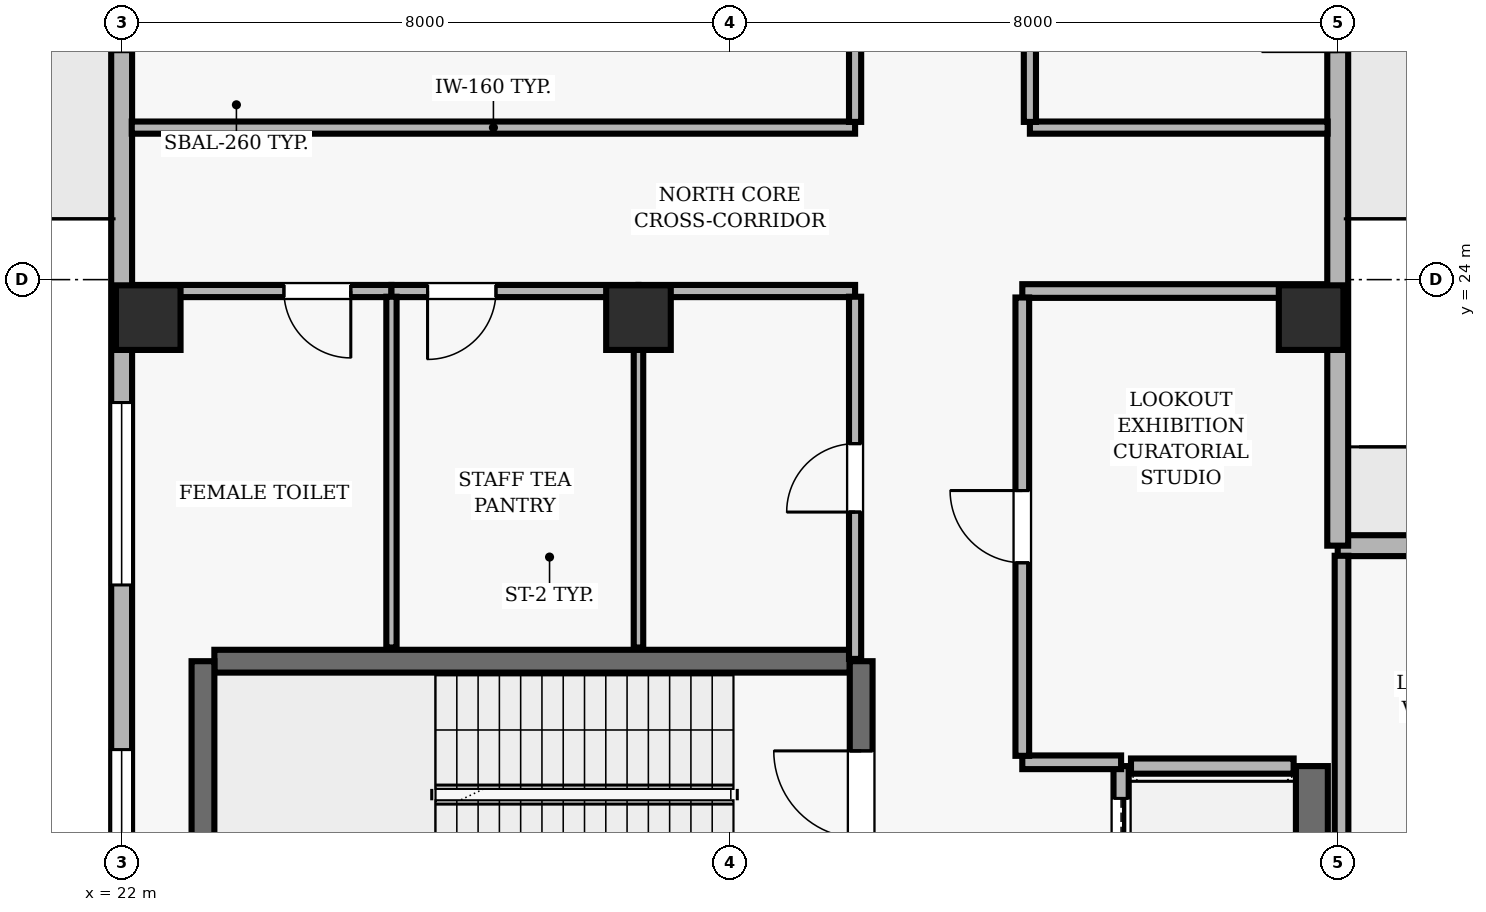
"""IFC4 building model, lengths in metres.
Left out: names, types, materials, properties, quantities, classifications, styles, units other than length and angle.
Written with IfcOpenShell. Run it as: python <this file> out.ifc"""

import sys

from ifc_helpers import new_model, si_unit, direction, frame, frame_2d, origin, origin_2d, place, context, subcontext, project, spatial, rectangle, extrude, element, fill, save


model = new_model("IFC4")
c1 = context("Model", 3, precision=1e-05, world=origin(), true_north=direction((0.0, 1.0)))
c2 = subcontext(c1, "Body", "Model", "MODEL_VIEW")
j1 = project(units=[si_unit("LENGTHUNIT", "METRE"), si_unit("PLANEANGLEUNIT", "RADIAN")], contexts=[c1])
p1 = place(None, origin())
s1 = spatial("IfcSite", under=j1, at=p1, CompositionType="ELEMENT")
p2 = place(p1, origin())
s2 = spatial("IfcBuilding", under=s1, at=p2, CompositionType="ELEMENT")
p3 = place(p2, frame((0.0, 0.0, 311.7)))
s3 = spatial("IfcBuildingStorey", under=s2, at=p3, CompositionType="ELEMENT", Elevation=311.7)
for number, where, z_axis, x_axis in (
    (1, (22.35, 23.5, 0.0), (0.0, 0.0, 1.0), (1.0, 0.0, 0.0)),
    (2, (28.8, 23.5, 0.0), (0.0, 0.0, 1.0), (1.0, 0.0, 0.0)),
    (3, (37.65, 23.5, 0.0), (0.0, 0.0, 1.0), (1.0, 0.0, 0.0)),
):
    element("IfcColumn", number, at=place(p3, frame(where, z_axis=z_axis, x_axis=x_axis)), inside=s3, PredefinedType="COLUMN", context=c2, shape_type="SweptSolid", body=[
        extrude(rectangle(XDim=0.85, YDim=0.85, at=origin_2d()), origin(), (0.0, 0.0, 1.0), 5.0),
    ])
p4 = place(p3, frame((41.15, 20.5, 0.0), z_axis=(0.0, 0.0, 1.0), x_axis=(-1.0, 0.0, 0.0)))
e4 = element("IfcWall", 4, at=p4, inside=s3, PredefinedType="SOLIDWALL", context=c2, shape_type="SweptSolid", body=[
    extrude(rectangle(XDim=3.15, YDim=0.275, at=frame_2d((1.575, 0.0))), origin(), (0.0, 0.0, 1.0), 4.74),
])
p5 = place(p3, frame((38.0, 20.5, 0.0), z_axis=(0.0, 0.0, 1.0), x_axis=(0.0, 1.0, 0.0)))
e5 = element("IfcWall", 5, at=p5, inside=s3, PredefinedType="SOLIDWALL", context=c2, shape_type="SweptSolid", body=[
    extrude(rectangle(XDim=14.8, YDim=0.275, at=frame_2d((7.4, 0.0))), origin(), (0.0, 0.0, 1.0), 4.74),
])
p6 = place(p5, frame((6.5, 0.0, 0.0)))
e6 = element("IfcOpeningElement", 6, at=p6, cuts=e5, PredefinedType="OPENING", context=c2, shape_type="SweptSolid", body=[
    extrude(rectangle(XDim=1.0, YDim=2.2, at=frame_2d((0.5, 1.1))), frame((0.0, 0.147, 0.0), z_axis=(0.0, -1.0, 0.0), x_axis=(1.0, 0.0, 0.0)), (0.0, 0.0, 1.0), 0.295),
])
p7 = place(p5, frame((10.5, 0.0, 0.9)))
e7 = element("IfcOpeningElement", 7, at=p7, cuts=e5, PredefinedType="OPENING", context=c2, shape_type="SweptSolid", body=[
    extrude(rectangle(XDim=1.2, YDim=1.6, at=frame_2d((0.6, 0.8))), frame((0.0, 0.147, 0.0), z_axis=(0.0, -1.0, 0.0), x_axis=(1.0, 0.0, 0.0)), (0.0, 0.0, 1.0), 0.295),
])
p8 = place(p3, frame((22.0, 35.3, 0.0), z_axis=(0.0, 0.0, 1.0), x_axis=(0.0, -1.0, 0.0)))
e8 = element("IfcWall", 8, at=p8, inside=s3, PredefinedType="SOLIDWALL", context=c2, shape_type="SweptSolid", body=[
    extrude(rectangle(XDim=32.8, YDim=0.275, at=frame_2d((16.4, 0.0))), origin(), (0.0, 0.0, 1.0), 4.74),
])
p9 = place(p8, frame((7.3, 0.0, 0.0)))
e9 = element("IfcOpeningElement", 9, at=p9, cuts=e8, PredefinedType="OPENING", context=c2, shape_type="SweptSolid", body=[
    extrude(rectangle(XDim=1.0, YDim=2.2, at=frame_2d((0.5, 1.1))), frame((0.0, 0.147, 0.0), z_axis=(0.0, -1.0, 0.0), x_axis=(1.0, 0.0, 0.0)), (0.0, 0.0, 1.0), 0.295),
])
p10 = place(p8, frame((1.533, 0.0, 0.9)))
e10 = element("IfcOpeningElement", 10, at=p10, cuts=e8, PredefinedType="OPENING", context=c2, shape_type="SweptSolid", body=[
    extrude(rectangle(XDim=2.4, YDim=1.6, at=frame_2d((1.2, 0.8))), frame((0.0, 0.147, 0.0), z_axis=(0.0, -1.0, 0.0), x_axis=(1.0, 0.0, 0.0)), (0.0, 0.0, 1.0), 0.295),
])
p11 = place(p8, frame((12.917, 0.0, 0.9)))
e11 = element("IfcOpeningElement", 11, at=p11, cuts=e8, PredefinedType="OPENING", context=c2, shape_type="SweptSolid", body=[
    extrude(rectangle(XDim=2.4, YDim=1.6, at=frame_2d((1.2, 0.8))), frame((0.0, 0.147, 0.0), z_axis=(0.0, -1.0, 0.0), x_axis=(1.0, 0.0, 0.0)), (0.0, 0.0, 1.0), 0.295),
])
p12 = place(p8, frame((17.483, 0.0, 0.9)))
e12 = element("IfcOpeningElement", 12, at=p12, cuts=e8, PredefinedType="OPENING", context=c2, shape_type="SweptSolid", body=[
    extrude(rectangle(XDim=2.4, YDim=1.6, at=frame_2d((1.2, 0.8))), frame((0.0, 0.147, 0.0), z_axis=(0.0, -1.0, 0.0), x_axis=(1.0, 0.0, 0.0)), (0.0, 0.0, 1.0), 0.295),
])
p13 = place(p8, frame((23.4, 0.0, 0.9)))
e13 = element("IfcOpeningElement", 13, at=p13, cuts=e8, PredefinedType="OPENING", context=c2, shape_type="SweptSolid", body=[
    extrude(rectangle(XDim=2.4, YDim=1.6, at=frame_2d((1.2, 0.8))), frame((0.0, 0.147, 0.0), z_axis=(0.0, -1.0, 0.0), x_axis=(1.0, 0.0, 0.0)), (0.0, 0.0, 1.0), 0.295),
])
p14 = place(p3, frame((31.58, 18.98, 0.0), z_axis=(0.0, 0.0, 1.0), x_axis=(-1.0, 0.0, 0.0)))
e14 = element("IfcWall", 14, at=p14, inside=s3, PredefinedType="SHEAR", context=c2, shape_type="SweptSolid", body=[
    extrude(rectangle(XDim=8.36, YDim=0.3, at=frame_2d((4.18, 0.0))), origin(), (0.0, 0.0, 1.0), 4.74),
])
p15 = place(p3, frame((23.07, 18.98, 0.0), z_axis=(0.0, 0.0, 1.0), x_axis=(0.0, -1.0, 0.0)))
e15 = element("IfcWall", 15, at=p15, inside=s3, PredefinedType="SHEAR", context=c2, shape_type="SweptSolid", body=[
    extrude(rectangle(XDim=3.51, YDim=0.3, at=frame_2d((1.755, 0.0))), origin(), (0.0, 0.0, 1.0), 4.74),
])
p16 = place(p3, frame((31.73, 15.47, 0.0), z_axis=(0.0, 0.0, 1.0), x_axis=(0.0, 1.0, 0.0)))
e16 = element("IfcWall", 16, at=p16, inside=s3, PredefinedType="SHEAR", context=c2, shape_type="SweptSolid", body=[
    extrude(rectangle(XDim=3.51, YDim=0.3, at=frame_2d((1.755, 0.0))), origin(), (0.0, 0.0, 1.0), 4.74),
])
p17 = place(p16, frame((1.18, 0.0, 0.0)))
e17 = element("IfcOpeningElement", 17, at=p17, cuts=e16, PredefinedType="OPENING", context=c2, shape_type="SweptSolid", body=[
    extrude(rectangle(XDim=1.15, YDim=2.15, at=frame_2d((0.575, 1.075))), frame((0.0, 0.16, 0.0), z_axis=(0.0, -1.0, 0.0), x_axis=(1.0, 0.0, 0.0)), (0.0, 0.0, 1.0), 0.32),
])
p18 = place(p3, frame((35.15, 17.6, 0.0), z_axis=(0.0, 0.0, 1.0), x_axis=(0.0, -1.0, 0.0)))
e18 = element("IfcWall", 18, at=p18, inside=s3, PredefinedType="SOLIDWALL", context=c2, shape_type="SweptSolid", body=[
    extrude(rectangle(XDim=1.85, YDim=0.2, at=frame_2d((0.925, 0.0))), origin(), (0.0, 0.0, 1.0), 4.74),
])
p19 = place(p18, frame((0.425, 0.0, 0.0)))
e19 = element("IfcOpeningElement", 19, at=p19, cuts=e18, PredefinedType="OPENING", context=c2, shape_type="SweptSolid", body=[
    extrude(rectangle(XDim=1.0, YDim=2.1, at=frame_2d((0.5, 1.05))), frame((0.0, 0.11, 0.0), z_axis=(0.0, -1.0, 0.0), x_axis=(1.0, 0.0, 0.0)), (0.0, 0.0, 1.0), 0.22),
])
p20 = place(p3, frame((37.66, 15.75, 0.0), z_axis=(0.0, 0.0, 1.0), x_axis=(0.0, 1.0, 0.0)))
e20 = element("IfcWall", 20, at=p20, inside=s3, PredefinedType="SHEAR", context=c2, shape_type="SweptSolid", body=[
    extrude(rectangle(XDim=1.85, YDim=0.42, at=frame_2d((0.925, 0.0))), origin(), (0.0, 0.0, 1.0), 4.74),
])
p21 = place(p3, frame((37.42, 17.6, 0.0), z_axis=(0.0, 0.0, 1.0), x_axis=(-1.0, 0.0, 0.0)))
e21 = element("IfcWall", 21, at=p21, inside=s3, PredefinedType="SOLIDWALL", context=c2, shape_type="SweptSolid", body=[
    extrude(rectangle(XDim=2.14, YDim=0.2, at=frame_2d((1.07, 0.0))), origin(), (0.0, 0.0, 1.0), 4.74),
])
p22 = place(p3, frame((25.55, 23.85, 0.0), z_axis=(0.0, 0.0, 1.0), x_axis=(-1.0, 0.0, 0.0)))
e22 = element("IfcWall", 22, at=p22, inside=s3, PredefinedType="PARTITIONING", context=c2, shape_type="SweptSolid", body=[
    extrude(rectangle(XDim=3.35, YDim=0.16, at=frame_2d((1.675, 0.0))), origin(), (0.0, 0.0, 1.0), 4.271),
])
p23 = place(p22, frame((0.535, 0.0, 0.0)))
e23 = element("IfcOpeningElement", 23, at=p23, cuts=e22, PredefinedType="OPENING", context=c2, shape_type="SweptSolid", body=[
    extrude(rectangle(XDim=0.88, YDim=2.1, at=frame_2d((0.44, 1.05))), frame((0.0, 0.09, 0.0), z_axis=(0.0, -1.0, 0.0), x_axis=(1.0, 0.0, 0.0)), (0.0, 0.0, 1.0), 0.18),
])
p24 = place(p3, frame((28.8, 23.85, 0.0), z_axis=(0.0, 0.0, 1.0), x_axis=(-1.0, 0.0, 0.0)))
e24 = element("IfcWall", 24, at=p24, inside=s3, PredefinedType="PARTITIONING", context=c2, shape_type="SweptSolid", body=[
    extrude(rectangle(XDim=3.25, YDim=0.16, at=frame_2d((1.625, 0.0))), origin(), (0.0, 0.0, 1.0), 4.271),
])
p25 = place(p24, frame((1.875, 0.0, 0.0)))
e25 = element("IfcOpeningElement", 25, at=p25, cuts=e24, PredefinedType="OPENING", context=c2, shape_type="SweptSolid", body=[
    extrude(rectangle(XDim=0.9, YDim=2.1, at=frame_2d((0.45, 1.05))), frame((0.0, 0.09, 0.0), z_axis=(0.0, -1.0, 0.0), x_axis=(1.0, 0.0, 0.0)), (0.0, 0.0, 1.0), 0.18),
])
p26 = place(p3, frame((31.65, 23.85, 0.0), z_axis=(0.0, 0.0, 1.0), x_axis=(-1.0, 0.0, 0.0)))
e26 = element("IfcWall", 26, at=p26, inside=s3, PredefinedType="PARTITIONING", context=c2, shape_type="SweptSolid", body=[
    extrude(rectangle(XDim=2.85, YDim=0.16, at=frame_2d((1.425, 0.0))), origin(), (0.0, 0.0, 1.0), 4.271),
])
p27 = place(p3, frame((31.65, 26.0, 0.0), z_axis=(0.0, 0.0, 1.0), x_axis=(-1.0, 0.0, 0.0)))
e27 = element("IfcWall", 27, at=p27, inside=s3, PredefinedType="PARTITIONING", context=c2, shape_type="SweptSolid", body=[
    extrude(rectangle(XDim=9.517, YDim=0.16, at=frame_2d((4.758, 0.0))), origin(), (0.0, 0.0, 1.0), 4.74),
])
p28 = place(p3, frame((33.85, 17.65, 0.0), z_axis=(0.0, 0.0, 1.0), x_axis=(1.0, 0.0, 0.0)))
e28 = element("IfcWall", 28, at=p28, inside=s3, PredefinedType="PARTITIONING", context=c2, shape_type="SweptSolid", body=[
    extrude(rectangle(XDim=1.3, YDim=0.18, at=frame_2d((0.65, 0.0))), origin(), (0.0, 0.0, 1.0), 4.74),
])
p29 = place(p3, frame((37.85, 23.85, 0.0), z_axis=(0.0, 0.0, 1.0), x_axis=(-1.0, 0.0, 0.0)))
e29 = element("IfcWall", 29, at=p29, inside=s3, PredefinedType="PARTITIONING", context=c2, shape_type="SweptSolid", body=[
    extrude(rectangle(XDim=4.0, YDim=0.18, at=frame_2d((2.0, 0.0))), origin(), (0.0, 0.0, 1.0), 4.271),
])
p30 = place(p3, frame((37.867, 26.0, 0.0), z_axis=(0.0, 0.0, 1.0), x_axis=(-1.0, 0.0, 0.0)))
e30 = element("IfcWall", 30, at=p30, inside=s3, PredefinedType="PARTITIONING", context=c2, shape_type="SweptSolid", body=[
    extrude(rectangle(XDim=3.917, YDim=0.16, at=frame_2d((1.958, 0.0))), origin(), (0.0, 0.0, 1.0), 4.74),
])
p31 = place(p3, frame((25.55, 19.16, 0.0), z_axis=(0.0, 0.0, 1.0), x_axis=(0.0, 1.0, 0.0)))
e31 = element("IfcWall", 31, at=p31, inside=s3, PredefinedType="PARTITIONING", context=c2, shape_type="SweptSolid", body=[
    extrude(rectangle(XDim=4.615, YDim=0.135, at=frame_2d((2.308, 0.0))), origin(), (0.0, 0.0, 1.0), 4.74),
])
p32 = place(p3, frame((28.8, 23.775, 0.0), z_axis=(0.0, 0.0, 1.0), x_axis=(0.0, -1.0, 0.0)))
e32 = element("IfcWall", 32, at=p32, inside=s3, PredefinedType="PARTITIONING", context=c2, shape_type="SweptSolid", body=[
    extrude(rectangle(XDim=4.615, YDim=0.125, at=frame_2d((2.308, 0.0))), origin(), (0.0, 0.0, 1.0), 4.74),
])
p33 = place(p3, frame((31.65, 19.01, 0.0), z_axis=(0.0, 0.0, 1.0), x_axis=(0.0, 1.0, 0.0)))
e33 = element("IfcWall", 33, at=p33, inside=s3, PredefinedType="PARTITIONING", context=c2, shape_type="SweptSolid", body=[
    extrude(rectangle(XDim=4.765, YDim=0.16, at=frame_2d((2.382, 0.0))), origin(), (0.0, 0.0, 1.0), 4.74),
])
p34 = place(p33, frame((1.932, 0.0, 0.0)))
e34 = element("IfcOpeningElement", 34, at=p34, cuts=e33, PredefinedType="OPENING", context=c2, shape_type="SweptSolid", body=[
    extrude(rectangle(XDim=0.9, YDim=2.1, at=frame_2d((0.45, 1.05))), frame((0.0, 0.09, 0.0), z_axis=(0.0, -1.0, 0.0), x_axis=(1.0, 0.0, 0.0)), (0.0, 0.0, 1.0), 0.18),
])
p35 = place(p3, frame((31.65, 37.72, 0.0), z_axis=(0.0, 0.0, 1.0), x_axis=(0.0, -1.0, 0.0)))
e35 = element("IfcWall", 35, at=p35, inside=s3, PredefinedType="PARTITIONING", context=c2, shape_type="SweptSolid", body=[
    extrude(rectangle(XDim=11.645, YDim=0.16, at=frame_2d((5.823, 0.0))), origin(), (0.0, 0.0, 1.0), 4.74),
])
p36 = place(p35, frame((5.372, 0.0, 0.0)))
e36 = element("IfcOpeningElement", 36, at=p36, cuts=e35, PredefinedType="OPENING", context=c2, shape_type="SweptSolid", body=[
    extrude(rectangle(XDim=0.9, YDim=2.1, at=frame_2d((0.45, 1.05))), frame((0.0, 0.09, 0.0), z_axis=(0.0, -1.0, 0.0), x_axis=(1.0, 0.0, 0.0)), (0.0, 0.0, 1.0), 0.18),
])
p37 = place(p3, frame((33.85, 17.735, 0.0), z_axis=(0.0, 0.0, 1.0), x_axis=(0.0, 1.0, 0.0)))
e37 = element("IfcWall", 37, at=p37, inside=s3, PredefinedType="PARTITIONING", context=c2, shape_type="SweptSolid", body=[
    extrude(rectangle(XDim=6.03, YDim=0.18, at=frame_2d((3.015, 0.0))), origin(), (0.0, 0.0, 1.0), 4.74),
])
p38 = place(p37, frame((2.54, 0.0, 0.0)))
e38 = element("IfcOpeningElement", 38, at=p38, cuts=e37, PredefinedType="OPENING", context=c2, shape_type="SweptSolid", body=[
    extrude(rectangle(XDim=0.95, YDim=2.1, at=frame_2d((0.475, 1.05))), frame((0.0, 0.1, 0.0), z_axis=(0.0, -1.0, 0.0), x_axis=(1.0, 0.0, 0.0)), (0.0, 0.0, 1.0), 0.2),
])
p39 = place(p3, frame((33.95, 26.075, 0.0), z_axis=(0.0, 0.0, 1.0), x_axis=(0.0, 1.0, 0.0)))
e39 = element("IfcWall", 39, at=p39, inside=s3, PredefinedType="PARTITIONING", context=c2, shape_type="SweptSolid", body=[
    extrude(rectangle(XDim=11.645, YDim=0.16, at=frame_2d((5.823, 0.0))), origin(), (0.0, 0.0, 1.0), 4.74),
])
p40 = place(p39, frame((5.372, 0.0, 0.0)))
e40 = element("IfcOpeningElement", 40, at=p40, cuts=e39, PredefinedType="OPENING", context=c2, shape_type="SweptSolid", body=[
    extrude(rectangle(XDim=0.9, YDim=2.1, at=frame_2d((0.45, 1.05))), frame((0.0, 0.09, 0.0), z_axis=(0.0, -1.0, 0.0), x_axis=(1.0, 0.0, 0.0)), (0.0, 0.0, 1.0), 0.18),
])
p41 = place(p3, frame((38.05, 20.367, 0.0), z_axis=(0.0, 0.0, 1.0), x_axis=(0.0, -1.0, 0.0)))
e41 = element("IfcWall", 41, at=p41, inside=s3, PredefinedType="PARTITIONING", context=c2, shape_type="SweptSolid", body=[
    extrude(rectangle(XDim=4.292, YDim=0.18, at=frame_2d((2.146, 0.0))), origin(), (0.0, 0.0, 1.0), 4.271),
])
p42 = place(p11, origin())
e42 = element("IfcWindow", 42, at=p42, inside=s3, PartitioningType="SINGLE_PANEL", PredefinedType="WINDOW", context=c2, shape_type="SweptSolid", body=[
    extrude(rectangle(XDim=2.4, YDim=1.6, at=frame_2d((1.2, 0.8))), frame((0.0, 0.03, 0.0), z_axis=(0.0, -1.0, 0.0), x_axis=(1.0, 0.0, 0.0)), (0.0, 0.0, 1.0), 0.06),
])
fill(e11, e42)
p43 = place(p12, origin())
e43 = element("IfcWindow", 43, at=p43, inside=s3, PartitioningType="SINGLE_PANEL", PredefinedType="WINDOW", context=c2, shape_type="SweptSolid", body=[
    extrude(rectangle(XDim=2.4, YDim=1.6, at=frame_2d((1.2, 0.8))), frame((0.0, 0.03, 0.0), z_axis=(0.0, -1.0, 0.0), x_axis=(1.0, 0.0, 0.0)), (0.0, 0.0, 1.0), 0.06),
])
fill(e12, e43)
p44 = place(p17, origin())
e44 = element("IfcDoor", 44, at=p44, inside=s3, OperationType="SINGLE_SWING_RIGHT", PredefinedType="DOOR", context=c2, shape_type="SweptSolid", body=[
    extrude(rectangle(XDim=1.15, YDim=2.15, at=frame_2d((0.575, 1.075))), frame((0.0, 0.025, 0.0), z_axis=(0.0, -1.0, 0.0), x_axis=(1.0, 0.0, 0.0)), (0.0, 0.0, 1.0), 0.05),
])
fill(e17, e44)
p45 = place(p19, origin())
e45 = element("IfcDoor", 45, at=p45, inside=s3, OperationType="DOUBLE_DOOR_SLIDING", PredefinedType="DOOR", context=c2, shape_type="SweptSolid", body=[
    extrude(rectangle(XDim=1.0, YDim=2.1, at=frame_2d((0.5, 1.05))), frame((0.0, 0.025, 0.0), z_axis=(0.0, -1.0, 0.0), x_axis=(1.0, 0.0, 0.0)), (0.0, 0.0, 1.0), 0.05),
])
fill(e19, e45)
p46 = place(p38, origin())
e46 = element("IfcDoor", 46, at=p46, inside=s3, OperationType="SINGLE_SWING_RIGHT", PredefinedType="DOOR", context=c2, shape_type="SweptSolid", body=[
    extrude(rectangle(XDim=0.95, YDim=2.1, at=frame_2d((0.475, 1.05))), frame((0.0, 0.025, 0.0), z_axis=(0.0, -1.0, 0.0), x_axis=(1.0, 0.0, 0.0)), (0.0, 0.0, 1.0), 0.05),
])
fill(e38, e46)
p47 = place(p34, origin())
e47 = element("IfcDoor", 47, at=p47, inside=s3, OperationType="SINGLE_SWING_LEFT", PredefinedType="DOOR", context=c2, shape_type="SweptSolid", body=[
    extrude(rectangle(XDim=0.9, YDim=2.1, at=frame_2d((0.45, 1.05))), frame((0.0, 0.025, 0.0), z_axis=(0.0, -1.0, 0.0), x_axis=(1.0, 0.0, 0.0)), (0.0, 0.0, 1.0), 0.05),
])
fill(e34, e47)
p48 = place(p23, origin())
e48 = element("IfcDoor", 48, at=p48, inside=s3, OperationType="SINGLE_SWING_LEFT", PredefinedType="DOOR", context=c2, shape_type="SweptSolid", body=[
    extrude(rectangle(XDim=0.88, YDim=2.1, at=frame_2d((0.44, 1.05))), frame((0.0, 0.025, 0.0), z_axis=(0.0, -1.0, 0.0), x_axis=(1.0, 0.0, 0.0)), (0.0, 0.0, 1.0), 0.05),
])
fill(e23, e48)
p49 = place(p25, origin())
e49 = element("IfcDoor", 49, at=p49, inside=s3, OperationType="SINGLE_SWING_RIGHT", PredefinedType="DOOR", context=c2, shape_type="SweptSolid", body=[
    extrude(rectangle(XDim=0.9, YDim=2.1, at=frame_2d((0.45, 1.05))), frame((0.0, 0.025, 0.0), z_axis=(0.0, -1.0, 0.0), x_axis=(1.0, 0.0, 0.0)), (0.0, 0.0, 1.0), 0.05),
])
fill(e25, e49)
save(model, sys.argv[1])
